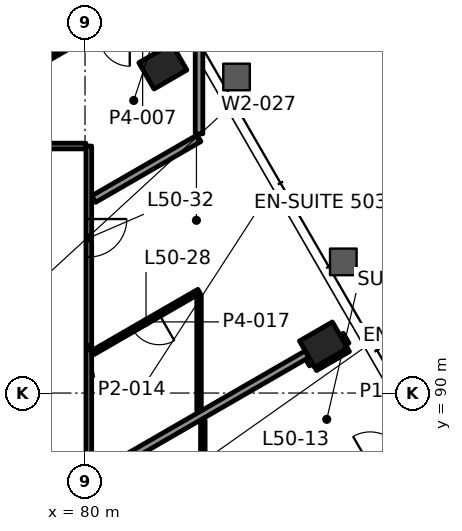
"""IFC4 building model, lengths in metres.
Left out: names, types, materials, properties, quantities, classifications, styles, units other than length and angle.
Written with IfcOpenShell. Run it as: python <this file> out.ifc"""

import sys

from ifc_helpers import new_model, si_unit, direction, frame, frame_2d, origin, origin_2d, place, context, subcontext, project, spatial, rectangle, hollow_rectangle, extrude, element, fill, save


model = new_model("IFC4")
c1 = context("Model", 3, precision=1e-05, world=origin(), true_north=direction((0.0, 1.0)))
c2 = subcontext(c1, "Body", "Model", "MODEL_VIEW")
j1 = project(units=[si_unit("LENGTHUNIT", "METRE"), si_unit("PLANEANGLEUNIT", "RADIAN")], contexts=[c1])
p1 = place(None, origin())
s1 = spatial("IfcSite", under=j1, at=p1, CompositionType="ELEMENT")
p2 = place(p1, origin())
s2 = spatial("IfcBuilding", under=s1, at=p2, CompositionType="ELEMENT")
p3 = place(p2, frame((0.0, 0.0, 214.3)))
s3 = spatial("IfcBuildingStorey", under=s2, at=p3, CompositionType="ELEMENT", Elevation=214.3)
for number, where, z_axis, x_axis in (
    (1, (86.276, 91.274, -0.0), (0.0, 0.0, 1.0), (-0.5, 0.866, 0.0)),
    (2, (82.048, 98.597, -0.0), (0.0, 0.0, 1.0), (-0.5, 0.866, 0.0)),
):
    element("IfcColumn", number, at=place(p3, frame(where, z_axis=z_axis, x_axis=x_axis)), inside=s3, PredefinedType="COLUMN", context=c2, shape_type="SweptSolid", body=[
        extrude(hollow_rectangle(XDim=0.8, YDim=1.0, WallThickness=0.05, at=origin_2d()), origin(), (0.0, 0.0, 1.0), 3.9),
    ])
p4 = place(p3, frame((75.975, 96.5, 0.0), z_axis=(0.0, 0.0, 1.0), x_axis=(1.0, 0.0, 0.0)))
e3 = element("IfcWall", 3, at=p4, inside=s3, PredefinedType="PARTITIONING", context=c2, shape_type="SweptSolid", body=[
    extrude(rectangle(XDim=4.049, YDim=0.15, at=frame_2d((2.025, 0.0))), origin(), (0.0, 0.0, 1.0), 3.1),
])
p5 = place(p3, frame((87.301, 87.96, 0.0), z_axis=(0.0, 0.0, 1.0), x_axis=(0.866000772924, 0.500042659475, 0.0)))
e4 = element("IfcWall", 4, at=p5, inside=s3, PredefinedType="PARTITIONING", context=c2, shape_type="SweptSolid", body=[
    extrude(rectangle(XDim=1.87, YDim=0.1, at=frame_2d((0.935, 0.0))), origin(), (0.0, 0.0, 1.0), 3.022),
])
p6 = place(p5, frame((0.235, 0.0, 0.0)))
e5 = element("IfcOpeningElement", 5, at=p6, cuts=e4, PredefinedType="OPENING", context=c2, shape_type="SweptSolid", body=[
    extrude(rectangle(XDim=0.9, YDim=2.1, at=frame_2d((0.45, 1.05))), frame((0.0, 0.06, 0.0), z_axis=(0.0, -1.0, 0.0), x_axis=(1.0, 0.0, 0.0)), (0.0, 0.0, 1.0), 0.12),
])
p7 = place(p3, frame((86.043, 90.678, 0.0), z_axis=(0.0, 0.0, 1.0), x_axis=(0.866039090965, 0.499976292358, 0.0)))
e6 = element("IfcWall", 6, at=p7, inside=s3, PredefinedType="PARTITIONING", context=c2, shape_type="SweptSolid", body=[
    extrude(rectangle(XDim=0.999, YDim=0.2, at=frame_2d((0.5, 0.0))), origin(), (0.0, 0.0, 1.0), 3.022),
])
p8 = place(p3, frame((80.227, 87.782, 0.0), z_axis=(0.0, 0.0, 1.0), x_axis=(0.866028841934, 0.499994044904, 0.0)))
e7 = element("IfcWall", 7, at=p8, inside=s3, PredefinedType="PARTITIONING", context=c2, shape_type="SweptSolid", body=[
    extrude(rectangle(XDim=6.484, YDim=0.2, at=frame_2d((3.242, 0.0))), origin(), (0.0, 0.0, 1.0), 3.1),
])
p9 = place(p3, frame((83.0, 92.677, 0.0), z_axis=(0.0, 0.0, 1.0), x_axis=(-0.866029130051, -0.499993545862, 0.0)))
e8 = element("IfcWall", 8, at=p9, inside=s3, PredefinedType="PARTITIONING", context=c2, shape_type="SweptSolid", body=[
    extrude(rectangle(XDim=3.222, YDim=0.12, at=frame_2d((1.611, 0.0))), origin(), (0.0, 0.0, 1.0), 3.1),
])
p10 = place(p9, frame((1.211, 0.0, 0.0)))
e9 = element("IfcOpeningElement", 9, at=p10, cuts=e8, PredefinedType="OPENING", context=c2, shape_type="SweptSolid", body=[
    extrude(rectangle(XDim=0.8, YDim=2.1, at=frame_2d((0.4, 1.05))), frame((0.0, 0.07, 0.0), z_axis=(0.0, -1.0, 0.0), x_axis=(1.0, 0.0, 0.0)), (0.0, 0.0, 1.0), 0.14),
])
p11 = place(p3, frame((80.227, 95.104, 0.0), z_axis=(0.0, 0.0, 1.0), x_axis=(0.866029421769, 0.499993040581, 0.0)))
e10 = element("IfcWall", 10, at=p11, inside=s3, PredefinedType="PARTITIONING", context=c2, shape_type="SweptSolid", body=[
    extrude(rectangle(XDim=3.202, YDim=0.2, at=frame_2d((1.601, 0.0))), origin(), (0.0, 0.0, 1.0), 3.022),
])
p12 = place(p3, frame((76.01, 97.063, 0.0), z_axis=(0.0, 0.0, 1.0), x_axis=(0.866045536992, 0.499965126639, 0.0)))
e11 = element("IfcWall", 11, at=p12, inside=s3, PredefinedType="PARTITIONING", context=c2, shape_type="SweptSolid", body=[
    extrude(rectangle(XDim=4.674, YDim=0.12, at=frame_2d((2.337, 0.0))), origin(), (0.0, 0.0, 1.0), 3.1),
])
p13 = place(p3, frame((83.1, 87.96, 0.0), z_axis=(0.0, 0.0, 1.0), x_axis=(0.0, 1.0, 0.0)))
e12 = element("IfcWall", 12, at=p13, inside=s3, PredefinedType="PARTITIONING", context=c2, shape_type="SweptSolid", body=[
    extrude(rectangle(XDim=1.325, YDim=0.12, at=frame_2d((0.663, 0.0))), origin(), (0.0, 0.0, 1.0), 3.1),
])
p14 = place(p3, frame((83.0, 89.538, 0.0), z_axis=(0.0, 0.0, 1.0), x_axis=(0.0, 1.0, 0.0)))
e13 = element("IfcWall", 13, at=p14, inside=s3, PredefinedType="PARTITIONING", context=c2, shape_type="SweptSolid", body=[
    extrude(rectangle(XDim=3.031, YDim=0.12, at=frame_2d((1.515, 0.0))), origin(), (0.0, 0.0, 1.0), 3.1),
])
p15 = place(p3, frame((83.0, 96.821, 0.0), z_axis=(0.0, 0.0, 1.0), x_axis=(0.0, 1.0, 0.0)))
e14 = element("IfcWall", 14, at=p15, inside=s3, PredefinedType="PARTITIONING", context=c2, shape_type="SweptSolid", body=[
    extrude(rectangle(XDim=2.328, YDim=0.2, at=frame_2d((1.164, 0.0))), origin(), (0.0, 0.0, 1.0), 3.022),
])
p16 = place(p3, frame((80.1, 96.5, 0.0), z_axis=(0.0, 0.0, 1.0), x_axis=(0.0, -1.0, 0.0)))
e15 = element("IfcWall", 15, at=p16, inside=s3, PredefinedType="PARTITIONING", context=c2, shape_type="SweptSolid", body=[
    extrude(rectangle(XDim=10.6, YDim=0.15, at=frame_2d((5.3, 0.0))), origin(), (0.0, 0.0, 1.0), 3.097),
])
p17 = place(p16, frame((1.92, 0.0, 0.0)))
e16 = element("IfcOpeningElement", 16, at=p17, cuts=e15, PredefinedType="OPENING", context=c2, shape_type="SweptSolid", body=[
    extrude(rectangle(XDim=1.0, YDim=2.1, at=frame_2d((0.5, 1.05))), frame((0.0, 0.085, 0.0), z_axis=(0.0, -1.0, 0.0), x_axis=(1.0, 0.0, 0.0)), (0.0, 0.0, 1.0), 0.17),
])
p18 = place(p3, frame((86.859, 91.264, 0.0), z_axis=(0.0, 0.0, 1.0), x_axis=(-0.500264001326, 0.865872928886, 0.0)))
e17 = element("IfcWall", 17, at=p18, inside=s3, PredefinedType="PARTITIONING", context=c2, shape_type="SweptSolid", body=[
    extrude(rectangle(XDim=0.299, YDim=0.2, at=frame_2d((0.149, 0.0))), origin(), (0.0, 0.0, 1.0), 3.1),
])
p19 = place(p3, frame((85.993, 90.764, 0.0), z_axis=(0.0, 0.0, 1.0), x_axis=(-0.500359323436, 0.865817848887, 0.0)))
e18 = element("IfcWall", 18, at=p19, inside=s3, PredefinedType="PARTITIONING", context=c2, shape_type="SweptSolid", body=[
    extrude(rectangle(XDim=0.199, YDim=0.2, at=frame_2d((0.1, 0.0))), origin(), (0.0, 0.0, 1.0), 3.1),
])
p20 = place(p6, origin())
e19 = element("IfcDoor", 19, at=p20, inside=s3, OperationType="SINGLE_SWING_LEFT", PredefinedType="DOOR", context=c2, shape_type="SweptSolid", body=[
    extrude(rectangle(XDim=0.9, YDim=2.1, at=frame_2d((0.45, 1.05))), frame((0.0, 0.025, 0.0), z_axis=(0.0, -1.0, 0.0), x_axis=(1.0, 0.0, 0.0)), (0.0, 0.0, 1.0), 0.05),
])
fill(e5, e19)
p21 = place(p10, origin())
e20 = element("IfcDoor", 20, at=p21, inside=s3, OperationType="SINGLE_SWING_LEFT", PredefinedType="DOOR", context=c2, shape_type="SweptSolid", body=[
    extrude(rectangle(XDim=0.8, YDim=2.1, at=frame_2d((0.4, 1.05))), frame((0.0, 0.025, 0.0), z_axis=(0.0, -1.0, 0.0), x_axis=(1.0, 0.0, 0.0)), (0.0, 0.0, 1.0), 0.05),
])
fill(e9, e20)
p22 = place(p17, origin())
e21 = element("IfcDoor", 21, at=p22, inside=s3, OperationType="SINGLE_SWING_RIGHT", PredefinedType="DOOR", context=c2, shape_type="SweptSolid", body=[
    extrude(rectangle(XDim=1.0, YDim=2.1, at=frame_2d((0.5, 1.05))), frame((0.0, 0.025, 0.0), z_axis=(0.0, -1.0, 0.0), x_axis=(1.0, 0.0, 0.0)), (0.0, 0.0, 1.0), 0.05),
])
fill(e16, e21)
p23 = place(p3, origin())
p24 = place(p23, frame((85.829, 94.339, 0.15), z_axis=(0.0, 0.0, 1.0), x_axis=(-0.5, 0.866025, 0.0)))
p25 = place(p24, origin())
e22 = element("IfcWindow", 22, at=p25, inside=s3, PartitioningType="SINGLE_PANEL", PredefinedType="WINDOW", context=c2, shape_type="SweptSolid", body=[
    extrude(rectangle(XDim=2.743, YDim=3.55, at=frame_2d((1.372, 1.775))), frame((0.0, 0.03, 0.0), z_axis=(0.0, -1.0, 0.0), x_axis=(1.0, 0.0, 0.0)), (0.0, 0.0, 1.0), 0.06),
])
save(model, sys.argv[1])
